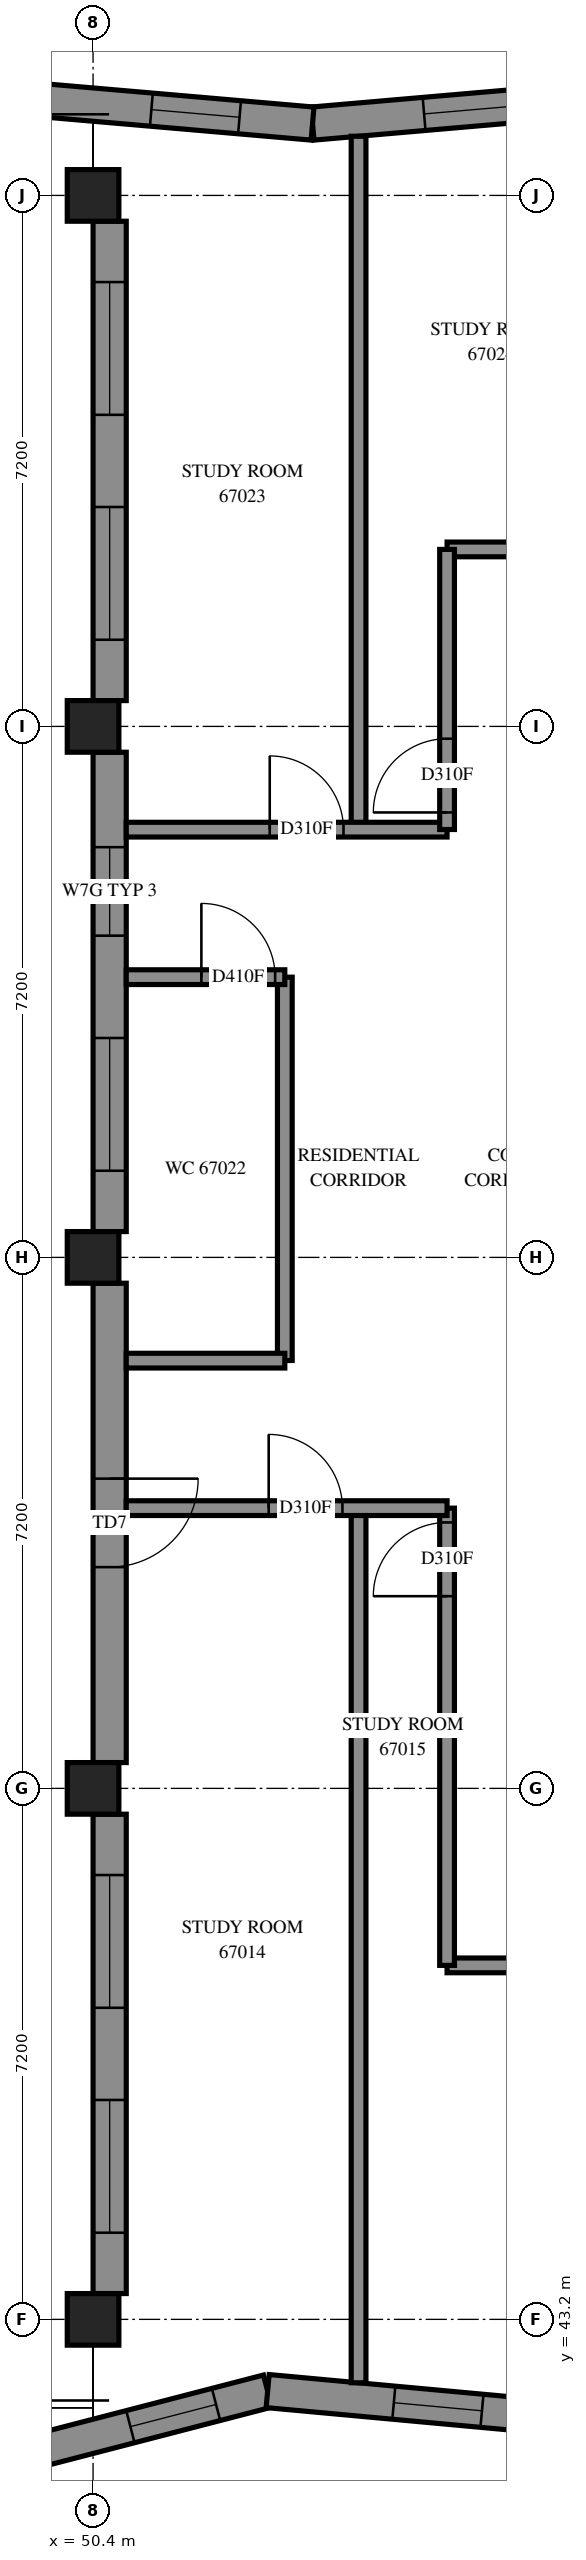
"""IFC4 building model, lengths in metres.
Left out: names, types, materials, properties, quantities, classifications, styles, units other than length and angle.
Written with IfcOpenShell. Run it as: python <this file> out.ifc"""

import sys

from ifc_helpers import new_model, si_unit, direction, frame, frame_2d, origin, origin_2d, place, context, subcontext, project, spatial, polyline, rectangle, outline, extrude, element, fill, save


model = new_model("IFC4")
c1 = context("Model", 3, precision=1e-05, world=origin(), true_north=direction((0.0, 1.0)))
c2 = subcontext(c1, "Body", "Model", "MODEL_VIEW")
j1 = project(units=[si_unit("LENGTHUNIT", "METRE"), si_unit("PLANEANGLEUNIT", "RADIAN")], contexts=[c1])
p1 = place(None, origin())
s1 = spatial("IfcSite", under=j1, at=p1, CompositionType="ELEMENT")
p2 = place(p1, origin())
s2 = spatial("IfcBuilding", under=s1, at=p2, CompositionType="ELEMENT")
p3 = place(p2, frame((0.0, 0.0, 247.2)))
s3 = spatial("IfcBuildingStorey", under=s2, at=p3, CompositionType="ELEMENT", Elevation=247.2)
for number, where, z_axis, x_axis in (
    (1, (50.4, 43.2, 0.0), (0.0, 0.0, 1.0), (1.0, 0.0, 0.0)),
    (2, (50.4, 50.4, 0.0), (0.0, 0.0, 1.0), (1.0, 0.0, 0.0)),
    (3, (50.4, 57.6, 0.0), (0.0, 0.0, 1.0), (1.0, 0.0, 0.0)),
    (4, (50.4, 64.8, 0.0), (0.0, 0.0, 1.0), (1.0, 0.0, 0.0)),
    (5, (50.4, 72.0, 0.0), (0.0, 0.0, 1.0), (1.0, 0.0, 0.0)),
):
    element("IfcColumn", number, at=place(p3, frame(where, z_axis=z_axis, x_axis=x_axis)), inside=s3, PredefinedType="COLUMN", context=c2, shape_type="SweptSolid", body=[
        extrude(rectangle(XDim=0.7, YDim=0.7, at=origin_2d()), origin(), (0.0, 0.0, 1.0), 3.1),
    ])
p4 = place(p3, frame((57.191, 73.304, 0.0), z_axis=(0.0, 0.0, 1.0), x_axis=(-0.9962798769, -0.0861766033, 0.0)))
e6 = element("IfcWall", 6, at=p4, inside=s3, PredefinedType="SOLIDWALL", context=c2, shape_type="SweptSolid", body=[
    extrude(outline(polyline([(-0.019, -0.225), (3.81, -0.225), (3.849, 0.225), (0.019, 0.225), (-0.019, -0.225)])), origin(), (0.0, 0.0, 1.0), 3.1),
])
p5 = place(p4, frame((1.111, 0.0, 0.45)))
e7 = element("IfcOpeningElement", 7, at=p5, cuts=e6, PredefinedType="OPENING", context=c2, shape_type="SweptSolid", body=[
    extrude(rectangle(XDim=1.2, YDim=2.55, at=frame_2d((0.6, 1.275))), frame((0.0, 0.235, 0.0), z_axis=(0.0, -1.0, 0.0), x_axis=(1.0, 0.0, 0.0)), (0.0, 0.0, 1.0), 0.47),
])
p6 = place(p3, frame((53.376, 72.974, 0.0), z_axis=(0.0, 0.0, 1.0), x_axis=(-0.9962800708, 0.0861743613, 0.0)))
e8 = element("IfcWall", 8, at=p6, inside=s3, PredefinedType="SOLIDWALL", context=c2, shape_type="SweptSolid", body=[
    extrude(outline(polyline([(0.019, -0.225), (3.849, -0.225), (3.81, 0.225), (-0.019, 0.225), (0.019, -0.225)])), origin(), (0.0, 0.0, 1.0), 3.1),
])
p7 = place(p6, frame((0.994, 0.0, 0.45)))
e9 = element("IfcOpeningElement", 9, at=p7, cuts=e8, PredefinedType="OPENING", context=c2, shape_type="SweptSolid", body=[
    extrude(rectangle(XDim=1.2, YDim=2.55, at=frame_2d((0.6, 1.275))), frame((0.0, 0.235, 0.0), z_axis=(0.0, -1.0, 0.0), x_axis=(1.0, 0.0, 0.0)), (0.0, 0.0, 1.0), 0.47),
])
p8 = place(p3, frame((49.425, 41.361, 0.0), z_axis=(0.0, 0.0, 1.0), x_axis=(0.9679703139, 0.2510646756, 0.0)))
e10 = element("IfcWall", 10, at=p8, inside=s3, PredefinedType="SOLIDWALL", context=c2, shape_type="SweptSolid", body=[
    extrude(outline(polyline([(-0.291, -0.225), (3.414, -0.225), (3.492, 0.225), (0.291, 0.225), (-0.291, -0.225)])), origin(), (0.0, 0.0, 1.0), 3.1),
])
p9 = place(p8, frame((1.53, 0.0, 0.45)))
e11 = element("IfcOpeningElement", 11, at=p9, cuts=e10, PredefinedType="OPENING", context=c2, shape_type="SweptSolid", body=[
    extrude(rectangle(XDim=1.2, YDim=2.55, at=frame_2d((0.6, 1.275))), frame((0.0, 0.235, 0.0), z_axis=(0.0, -1.0, 0.0), x_axis=(1.0, 0.0, 0.0)), (0.0, 0.0, 1.0), 0.47),
])
p10 = place(p3, frame((52.767, 42.228, 0.0), z_axis=(0.0, 0.0, 1.0), x_axis=(0.9957918129, -0.0916442329, 0.0)))
e12 = element("IfcWall", 12, at=p10, inside=s3, PredefinedType="SOLIDWALL", context=c2, shape_type="SweptSolid", body=[
    extrude(outline(polyline([(0.039, -0.225), (3.64, -0.225), (3.599, 0.225), (-0.039, 0.225), (0.039, -0.225)])), origin(), (0.0, 0.0, 1.0), 3.1),
])
p11 = place(p10, frame((1.718, 0.0, 0.45)))
e13 = element("IfcOpeningElement", 13, at=p11, cuts=e12, PredefinedType="OPENING", context=c2, shape_type="SweptSolid", body=[
    extrude(rectangle(XDim=1.2, YDim=2.55, at=frame_2d((0.6, 1.275))), frame((0.0, 0.235, 0.0), z_axis=(0.0, -1.0, 0.0), x_axis=(1.0, 0.0, 0.0)), (0.0, 0.0, 1.0), 0.47),
])
p12 = place(p3, frame((50.625, 71.65, 0.0), z_axis=(0.0, 0.0, 1.0), x_axis=(0.0, -1.0, 0.0)))
e14 = element("IfcWall", 14, at=p12, inside=s3, PredefinedType="SOLIDWALL", context=c2, shape_type="SweptSolid", body=[
    extrude(rectangle(XDim=6.5, YDim=0.45, at=frame_2d((3.25, 0.0))), origin(), (0.0, 0.0, 1.0), 3.1),
])
p13 = place(p12, frame((0.825, 0.0, 0.7)))
e15 = element("IfcOpeningElement", 15, at=p13, cuts=e14, PredefinedType="OPENING", context=c2, shape_type="SweptSolid", body=[
    extrude(rectangle(XDim=1.8, YDim=1.8, at=frame_2d((0.9, 0.9))), frame((0.0, 0.235, 0.0), z_axis=(0.0, -1.0, 0.0), x_axis=(1.0, 0.0, 0.0)), (0.0, 0.0, 1.0), 0.47),
])
p14 = place(p12, frame((3.875, 0.0, 0.7)))
e16 = element("IfcOpeningElement", 16, at=p14, cuts=e14, PredefinedType="OPENING", context=c2, shape_type="SweptSolid", body=[
    extrude(rectangle(XDim=1.8, YDim=1.8, at=frame_2d((0.9, 0.9))), frame((0.0, 0.235, 0.0), z_axis=(0.0, -1.0, 0.0), x_axis=(1.0, 0.0, 0.0)), (0.0, 0.0, 1.0), 0.47),
])
p15 = place(p3, frame((50.625, 64.45, 0.0), z_axis=(0.0, 0.0, 1.0), x_axis=(0.0, -1.0, 0.0)))
e17 = element("IfcWall", 17, at=p15, inside=s3, PredefinedType="SOLIDWALL", context=c2, shape_type="SweptSolid", body=[
    extrude(rectangle(XDim=6.5, YDim=0.45, at=frame_2d((3.25, 0.0))), origin(), (0.0, 0.0, 1.0), 3.1),
])
p16 = place(p15, frame((3.875, 0.0, 0.7)))
e18 = element("IfcOpeningElement", 18, at=p16, cuts=e17, PredefinedType="OPENING", context=c2, shape_type="SweptSolid", body=[
    extrude(rectangle(XDim=1.8, YDim=1.8, at=frame_2d((0.9, 0.9))), frame((0.0, 0.235, 0.0), z_axis=(0.0, -1.0, 0.0), x_axis=(1.0, 0.0, 0.0)), (0.0, 0.0, 1.0), 0.47),
])
p17 = place(p15, frame((1.288, 0.0, 0.6)))
e19 = element("IfcOpeningElement", 19, at=p17, cuts=e17, PredefinedType="OPENING", context=c2, shape_type="SweptSolid", body=[
    extrude(rectangle(XDim=1.2, YDim=1.9, at=frame_2d((0.6, 0.95))), frame((0.0, 0.235, 0.0), z_axis=(0.0, -1.0, 0.0), x_axis=(1.0, 0.0, 0.0)), (0.0, 0.0, 1.0), 0.47),
])
p18 = place(p3, frame((50.625, 57.25, 0.0), z_axis=(0.0, 0.0, 1.0), x_axis=(0.0, -1.0, 0.0)))
e20 = element("IfcWall", 20, at=p18, inside=s3, PredefinedType="SOLIDWALL", context=c2, shape_type="SweptSolid", body=[
    extrude(rectangle(XDim=6.5, YDim=0.45, at=frame_2d((3.25, 0.0))), origin(), (0.0, 0.0, 1.0), 3.1),
])
p19 = place(p18, frame((2.65, 0.0, 0.0)))
e21 = element("IfcOpeningElement", 21, at=p19, cuts=e20, PredefinedType="OPENING", context=c2, shape_type="SweptSolid", body=[
    extrude(rectangle(XDim=1.2, YDim=2.4, at=frame_2d((0.6, 1.2))), frame((0.0, 0.235, 0.0), z_axis=(0.0, -1.0, 0.0), x_axis=(1.0, 0.0, 0.0)), (0.0, 0.0, 1.0), 0.47),
])
p20 = place(p3, frame((50.625, 50.05, 0.0), z_axis=(0.0, 0.0, 1.0), x_axis=(0.0, -1.0, 0.0)))
e22 = element("IfcWall", 22, at=p20, inside=s3, PredefinedType="SOLIDWALL", context=c2, shape_type="SweptSolid", body=[
    extrude(rectangle(XDim=6.5, YDim=0.45, at=frame_2d((3.25, 0.0))), origin(), (0.0, 0.0, 1.0), 3.1),
])
p21 = place(p20, frame((0.825, 0.0, 0.7)))
e23 = element("IfcOpeningElement", 23, at=p21, cuts=e22, PredefinedType="OPENING", context=c2, shape_type="SweptSolid", body=[
    extrude(rectangle(XDim=1.8, YDim=1.8, at=frame_2d((0.9, 0.9))), frame((0.0, 0.235, 0.0), z_axis=(0.0, -1.0, 0.0), x_axis=(1.0, 0.0, 0.0)), (0.0, 0.0, 1.0), 0.47),
])
p22 = place(p20, frame((3.875, 0.0, 0.7)))
e24 = element("IfcOpeningElement", 24, at=p22, cuts=e22, PredefinedType="OPENING", context=c2, shape_type="SweptSolid", body=[
    extrude(rectangle(XDim=1.8, YDim=1.8, at=frame_2d((0.9, 0.9))), frame((0.0, 0.235, 0.0), z_axis=(0.0, -1.0, 0.0), x_axis=(1.0, 0.0, 0.0)), (0.0, 0.0, 1.0), 0.47),
])
p23 = place(p3, frame((55.2, 67.2, 0.0), z_axis=(0.0, 0.0, 1.0), x_axis=(1.0, 0.0, 0.0)))
e25 = element("IfcWall", 25, at=p23, inside=s3, PredefinedType="PARTITIONING", context=c2, shape_type="SweptSolid", body=[
    extrude(rectangle(XDim=19.2, YDim=0.2, at=frame_2d((9.6, 0.0))), origin(), (0.0, 0.0, 1.0), 3.1),
])
p24 = place(p23, frame((6.299, 0.0, 0.0)))
e26 = element("IfcOpeningElement", 26, at=p24, cuts=e25, PredefinedType="OPENING", context=c2, shape_type="SweptSolid", body=[
    extrude(rectangle(XDim=0.9, YDim=2.1, at=frame_2d((0.45, 1.05))), frame((0.0, 0.11, 0.0), z_axis=(0.0, -1.0, 0.0), x_axis=(1.0, 0.0, 0.0)), (0.0, 0.0, 1.0), 0.22),
])
p25 = place(p23, frame((13.65, 0.0, 0.0)))
e27 = element("IfcOpeningElement", 27, at=p25, cuts=e25, PredefinedType="OPENING", context=c2, shape_type="SweptSolid", body=[
    extrude(rectangle(XDim=0.9, YDim=2.1, at=frame_2d((0.45, 1.05))), frame((0.0, 0.11, 0.0), z_axis=(0.0, -1.0, 0.0), x_axis=(1.0, 0.0, 0.0)), (0.0, 0.0, 1.0), 0.22),
])
p26 = place(p3, frame((55.2, 48.0, 0.0), z_axis=(0.0, 0.0, 1.0), x_axis=(1.0, 0.0, 0.0)))
e28 = element("IfcWall", 28, at=p26, inside=s3, PredefinedType="PARTITIONING", context=c2, shape_type="SweptSolid", body=[
    extrude(rectangle(XDim=19.15, YDim=0.2, at=frame_2d((9.575, 0.0))), origin(), (0.0, 0.0, 1.0), 3.1),
])
p27 = place(p26, frame((6.299, 0.0, 0.0)))
e29 = element("IfcOpeningElement", 29, at=p27, cuts=e28, PredefinedType="OPENING", context=c2, shape_type="SweptSolid", body=[
    extrude(rectangle(XDim=0.9, YDim=2.1, at=frame_2d((0.45, 1.05))), frame((0.0, 0.11, 0.0), z_axis=(0.0, -1.0, 0.0), x_axis=(1.0, 0.0, 0.0)), (0.0, 0.0, 1.0), 0.22),
])
p28 = place(p26, frame((13.499, 0.0, 0.0)))
e30 = element("IfcOpeningElement", 30, at=p28, cuts=e28, PredefinedType="OPENING", context=c2, shape_type="SweptSolid", body=[
    extrude(rectangle(XDim=0.9, YDim=2.1, at=frame_2d((0.45, 1.05))), frame((0.0, 0.11, 0.0), z_axis=(0.0, -1.0, 0.0), x_axis=(1.0, 0.0, 0.0)), (0.0, 0.0, 1.0), 0.22),
])
p29 = place(p3, frame((54.0, 42.34, 0.0), z_axis=(0.0, 0.0, 1.0), x_axis=(0.0, 1.0, 0.0)))
e31 = element("IfcWall", 31, at=p29, inside=s3, PredefinedType="PARTITIONING", context=c2, shape_type="SweptSolid", body=[
    extrude(rectangle(XDim=11.86, YDim=0.2, at=frame_2d((5.93, 0.0))), origin(), (0.0, 0.0, 1.0), 3.1),
])
p30 = place(p3, frame((54.0, 63.4, 0.0), z_axis=(0.0, 0.0, 1.0), x_axis=(0.0, 1.0, 0.0)))
e32 = element("IfcWall", 32, at=p30, inside=s3, PredefinedType="PARTITIONING", context=c2, shape_type="SweptSolid", body=[
    extrude(rectangle(XDim=9.402, YDim=0.2, at=frame_2d((4.701, 0.0))), origin(), (0.0, 0.0, 1.0), 3.1),
])
p31 = place(p3, frame((55.2, 48.0, 0.0), z_axis=(0.0, 0.0, 1.0), x_axis=(0.0, 1.0, 0.0)))
e33 = element("IfcWall", 33, at=p31, inside=s3, PredefinedType="PARTITIONING", context=c2, shape_type="SweptSolid", body=[
    extrude(rectangle(XDim=6.2, YDim=0.2, at=frame_2d((3.1, 0.0))), origin(), (0.0, 0.0, 1.0), 3.1),
])
p32 = place(p31, frame((5.006, 0.0, 0.0)))
e34 = element("IfcOpeningElement", 34, at=p32, cuts=e33, PredefinedType="OPENING", context=c2, shape_type="SweptSolid", body=[
    extrude(rectangle(XDim=1.0, YDim=2.1, at=frame_2d((0.5, 1.05))), frame((0.0, 0.11, 0.0), z_axis=(0.0, -1.0, 0.0), x_axis=(1.0, 0.0, 0.0)), (0.0, 0.0, 1.0), 0.22),
])
p33 = place(p3, frame((53.0, 56.202, 0.0), z_axis=(0.0, 0.0, 1.0), x_axis=(0.0, 1.0, 0.0)))
e35 = element("IfcWall", 35, at=p33, inside=s3, PredefinedType="PARTITIONING", context=c2, shape_type="SweptSolid", body=[
    extrude(rectangle(XDim=5.198, YDim=0.2, at=frame_2d((2.599, 0.0))), origin(), (0.0, 0.0, 1.0), 3.1),
])
p34 = place(p3, frame((50.85, 54.2, 0.0), z_axis=(0.0, 0.0, 1.0), x_axis=(1.0, 0.0, 0.0)))
e36 = element("IfcWall", 36, at=p34, inside=s3, PredefinedType="PARTITIONING", context=c2, shape_type="SweptSolid", body=[
    extrude(rectangle(XDim=4.35, YDim=0.2, at=frame_2d((2.175, 0.0))), origin(), (0.0, 0.0, 1.0), 3.1),
])
p35 = place(p34, frame((1.931, 0.0, 0.0)))
e37 = element("IfcOpeningElement", 37, at=p35, cuts=e36, PredefinedType="OPENING", context=c2, shape_type="SweptSolid", body=[
    extrude(rectangle(XDim=1.0, YDim=2.1, at=frame_2d((0.5, 1.05))), frame((0.0, 0.11, 0.0), z_axis=(0.0, -1.0, 0.0), x_axis=(1.0, 0.0, 0.0)), (0.0, 0.0, 1.0), 0.22),
])
p36 = place(p3, frame((50.85, 63.4, 0.0), z_axis=(0.0, 0.0, 1.0), x_axis=(1.0, 0.0, 0.0)))
e38 = element("IfcWall", 38, at=p36, inside=s3, PredefinedType="PARTITIONING", context=c2, shape_type="SweptSolid", body=[
    extrude(rectangle(XDim=4.35, YDim=0.2, at=frame_2d((2.175, 0.0))), origin(), (0.0, 0.0, 1.0), 3.1),
])
p37 = place(p36, frame((1.946, 0.0, 0.0)))
e39 = element("IfcOpeningElement", 39, at=p37, cuts=e38, PredefinedType="OPENING", context=c2, shape_type="SweptSolid", body=[
    extrude(rectangle(XDim=1.0, YDim=2.1, at=frame_2d((0.5, 1.05))), frame((0.0, 0.11, 0.0), z_axis=(0.0, -1.0, 0.0), x_axis=(1.0, 0.0, 0.0)), (0.0, 0.0, 1.0), 0.22),
])
p38 = place(p3, frame((55.2, 63.402, 0.0), z_axis=(0.0, 0.0, 1.0), x_axis=(0.0, 1.0, 0.0)))
e40 = element("IfcWall", 40, at=p38, inside=s3, PredefinedType="PARTITIONING", context=c2, shape_type="SweptSolid", body=[
    extrude(rectangle(XDim=3.798, YDim=0.2, at=frame_2d((1.899, 0.0))), origin(), (0.0, 0.0, 1.0), 3.1),
])
p39 = place(p38, frame((0.231, 0.0, 0.0)))
e41 = element("IfcOpeningElement", 41, at=p39, cuts=e40, PredefinedType="OPENING", context=c2, shape_type="SweptSolid", body=[
    extrude(rectangle(XDim=1.0, YDim=2.1, at=frame_2d((0.5, 1.05))), frame((0.0, 0.11, 0.0), z_axis=(0.0, -1.0, 0.0), x_axis=(1.0, 0.0, 0.0)), (0.0, 0.0, 1.0), 0.22),
])
p40 = place(p3, frame((50.85, 56.2, 0.0), z_axis=(0.0, 0.0, 1.0), x_axis=(1.0, 0.0, 0.0)))
e42 = element("IfcWall", 42, at=p40, inside=s3, PredefinedType="PARTITIONING", context=c2, shape_type="SweptSolid", body=[
    extrude(rectangle(XDim=2.15, YDim=0.2, at=frame_2d((1.075, 0.0))), origin(), (0.0, 0.0, 1.0), 3.1),
])
p41 = place(p3, frame((50.85, 61.4, 0.0), z_axis=(0.0, 0.0, 1.0), x_axis=(1.0, 0.0, 0.0)))
e43 = element("IfcWall", 43, at=p41, inside=s3, PredefinedType="PARTITIONING", context=c2, shape_type="SweptSolid", body=[
    extrude(rectangle(XDim=2.15, YDim=0.2, at=frame_2d((1.075, 0.0))), origin(), (0.0, 0.0, 1.0), 3.1),
])
p42 = place(p41, frame((1.019, 0.0, 0.0)))
e44 = element("IfcOpeningElement", 44, at=p42, cuts=e43, PredefinedType="OPENING", context=c2, shape_type="SweptSolid", body=[
    extrude(rectangle(XDim=1.0, YDim=2.1, at=frame_2d((0.5, 1.05))), frame((0.0, 0.11, 0.0), z_axis=(0.0, -1.0, 0.0), x_axis=(1.0, 0.0, 0.0)), (0.0, 0.0, 1.0), 0.22),
])
p43 = place(p5, origin())
e45 = element("IfcWindow", 45, at=p43, inside=s3, PartitioningType="SINGLE_PANEL", PredefinedType="WINDOW", context=c2, shape_type="SweptSolid", body=[
    extrude(rectangle(XDim=1.2, YDim=2.55, at=frame_2d((0.6, 1.275))), frame((0.0, 0.205, 0.0), z_axis=(0.0, -1.0, 0.0), x_axis=(1.0, 0.0, 0.0)), (0.0, 0.0, 1.0), 0.06),
])
fill(e7, e45)
p44 = place(p7, origin())
e46 = element("IfcWindow", 46, at=p44, inside=s3, PartitioningType="SINGLE_PANEL", PredefinedType="WINDOW", context=c2, shape_type="SweptSolid", body=[
    extrude(rectangle(XDim=1.2, YDim=2.55, at=frame_2d((0.6, 1.275))), frame((0.0, 0.205, 0.0), z_axis=(0.0, -1.0, 0.0), x_axis=(1.0, 0.0, 0.0)), (0.0, 0.0, 1.0), 0.06),
])
fill(e9, e46)
p45 = place(p9, origin())
e47 = element("IfcWindow", 47, at=p45, inside=s3, PartitioningType="SINGLE_PANEL", PredefinedType="WINDOW", context=c2, shape_type="SweptSolid", body=[
    extrude(rectangle(XDim=1.2, YDim=2.55, at=frame_2d((0.6, 1.275))), frame((0.0, 0.205, 0.0), z_axis=(0.0, -1.0, 0.0), x_axis=(1.0, 0.0, 0.0)), (0.0, 0.0, 1.0), 0.06),
])
fill(e11, e47)
p46 = place(p11, origin())
e48 = element("IfcWindow", 48, at=p46, inside=s3, PartitioningType="SINGLE_PANEL", PredefinedType="WINDOW", context=c2, shape_type="SweptSolid", body=[
    extrude(rectangle(XDim=1.2, YDim=2.55, at=frame_2d((0.6, 1.275))), frame((0.0, 0.205, 0.0), z_axis=(0.0, -1.0, 0.0), x_axis=(1.0, 0.0, 0.0)), (0.0, 0.0, 1.0), 0.06),
])
fill(e13, e48)
p47 = place(p13, origin())
e49 = element("IfcWindow", 49, at=p47, inside=s3, PartitioningType="SINGLE_PANEL", PredefinedType="WINDOW", context=c2, shape_type="SweptSolid", body=[
    extrude(rectangle(XDim=1.8, YDim=1.8, at=frame_2d((0.9, 0.9))), frame((0.0, 0.205, 0.0), z_axis=(0.0, -1.0, 0.0), x_axis=(1.0, 0.0, 0.0)), (0.0, 0.0, 1.0), 0.06),
])
fill(e15, e49)
p48 = place(p14, origin())
e50 = element("IfcWindow", 50, at=p48, inside=s3, PartitioningType="SINGLE_PANEL", PredefinedType="WINDOW", context=c2, shape_type="SweptSolid", body=[
    extrude(rectangle(XDim=1.8, YDim=1.8, at=frame_2d((0.9, 0.9))), frame((0.0, 0.205, 0.0), z_axis=(0.0, -1.0, 0.0), x_axis=(1.0, 0.0, 0.0)), (0.0, 0.0, 1.0), 0.06),
])
fill(e16, e50)
p49 = place(p16, origin())
e51 = element("IfcWindow", 51, at=p49, inside=s3, PartitioningType="SINGLE_PANEL", PredefinedType="WINDOW", context=c2, shape_type="SweptSolid", body=[
    extrude(rectangle(XDim=1.8, YDim=1.8, at=frame_2d((0.9, 0.9))), frame((0.0, 0.205, 0.0), z_axis=(0.0, -1.0, 0.0), x_axis=(1.0, 0.0, 0.0)), (0.0, 0.0, 1.0), 0.06),
])
fill(e18, e51)
p50 = place(p21, origin())
e52 = element("IfcWindow", 52, at=p50, inside=s3, PartitioningType="SINGLE_PANEL", PredefinedType="WINDOW", context=c2, shape_type="SweptSolid", body=[
    extrude(rectangle(XDim=1.8, YDim=1.8, at=frame_2d((0.9, 0.9))), frame((0.0, 0.205, 0.0), z_axis=(0.0, -1.0, 0.0), x_axis=(1.0, 0.0, 0.0)), (0.0, 0.0, 1.0), 0.06),
])
fill(e23, e52)
p51 = place(p22, origin())
e53 = element("IfcWindow", 53, at=p51, inside=s3, PartitioningType="SINGLE_PANEL", PredefinedType="WINDOW", context=c2, shape_type="SweptSolid", body=[
    extrude(rectangle(XDim=1.8, YDim=1.8, at=frame_2d((0.9, 0.9))), frame((0.0, 0.205, 0.0), z_axis=(0.0, -1.0, 0.0), x_axis=(1.0, 0.0, 0.0)), (0.0, 0.0, 1.0), 0.06),
])
fill(e24, e53)
p52 = place(p19, origin())
e54 = element("IfcDoor", 54, at=p52, inside=s3, OperationType="SINGLE_SWING_LEFT", PredefinedType="DOOR", context=c2, shape_type="SweptSolid", body=[
    extrude(rectangle(XDim=1.2, YDim=2.4, at=frame_2d((0.6, 1.2))), frame((0.0, 0.025, 0.0), z_axis=(0.0, -1.0, 0.0), x_axis=(1.0, 0.0, 0.0)), (0.0, 0.0, 1.0), 0.05),
])
fill(e21, e54)
p53 = place(p35, origin())
e55 = element("IfcDoor", 55, at=p53, inside=s3, OperationType="SINGLE_SWING_LEFT", PredefinedType="DOOR", context=c2, shape_type="SweptSolid", body=[
    extrude(rectangle(XDim=1.0, YDim=2.1, at=frame_2d((0.5, 1.05))), frame((0.0, 0.025, 0.0), z_axis=(0.0, -1.0, 0.0), x_axis=(1.0, 0.0, 0.0)), (0.0, 0.0, 1.0), 0.05),
])
fill(e37, e55)
p54 = place(p32, origin())
e56 = element("IfcDoor", 56, at=p54, inside=s3, OperationType="SINGLE_SWING_RIGHT", PredefinedType="DOOR", context=c2, shape_type="SweptSolid", body=[
    extrude(rectangle(XDim=1.0, YDim=2.1, at=frame_2d((0.5, 1.05))), frame((0.0, 0.025, 0.0), z_axis=(0.0, -1.0, 0.0), x_axis=(1.0, 0.0, 0.0)), (0.0, 0.0, 1.0), 0.05),
])
fill(e34, e56)
p55 = place(p42, origin())
e57 = element("IfcDoor", 57, at=p55, inside=s3, OperationType="SINGLE_SWING_LEFT", PredefinedType="DOOR", context=c2, shape_type="SweptSolid", body=[
    extrude(rectangle(XDim=1.0, YDim=2.1, at=frame_2d((0.5, 1.05))), frame((0.0, 0.025, 0.0), z_axis=(0.0, -1.0, 0.0), x_axis=(1.0, 0.0, 0.0)), (0.0, 0.0, 1.0), 0.05),
])
fill(e44, e57)
p56 = place(p37, origin())
e58 = element("IfcDoor", 58, at=p56, inside=s3, OperationType="SINGLE_SWING_RIGHT", PredefinedType="DOOR", context=c2, shape_type="SweptSolid", body=[
    extrude(rectangle(XDim=1.0, YDim=2.1, at=frame_2d((0.5, 1.05))), frame((0.0, 0.025, 0.0), z_axis=(0.0, -1.0, 0.0), x_axis=(1.0, 0.0, 0.0)), (0.0, 0.0, 1.0), 0.05),
])
fill(e39, e58)
p57 = place(p39, origin())
e59 = element("IfcDoor", 59, at=p57, inside=s3, OperationType="SINGLE_SWING_LEFT", PredefinedType="DOOR", context=c2, shape_type="SweptSolid", body=[
    extrude(rectangle(XDim=1.0, YDim=2.1, at=frame_2d((0.5, 1.05))), frame((0.0, 0.025, 0.0), z_axis=(0.0, -1.0, 0.0), x_axis=(1.0, 0.0, 0.0)), (0.0, 0.0, 1.0), 0.05),
])
fill(e41, e59)
p58 = place(p17, origin())
e60 = element("IfcWindow", 60, at=p58, inside=s3, PartitioningType="SINGLE_PANEL", PredefinedType="WINDOW", context=c2, shape_type="SweptSolid", body=[
    extrude(rectangle(XDim=1.2, YDim=1.9, at=frame_2d((0.6, 0.95))), frame((0.0, 0.205, 0.0), z_axis=(0.0, -1.0, 0.0), x_axis=(1.0, 0.0, 0.0)), (0.0, 0.0, 1.0), 0.06),
])
fill(e19, e60)
save(model, sys.argv[1])
